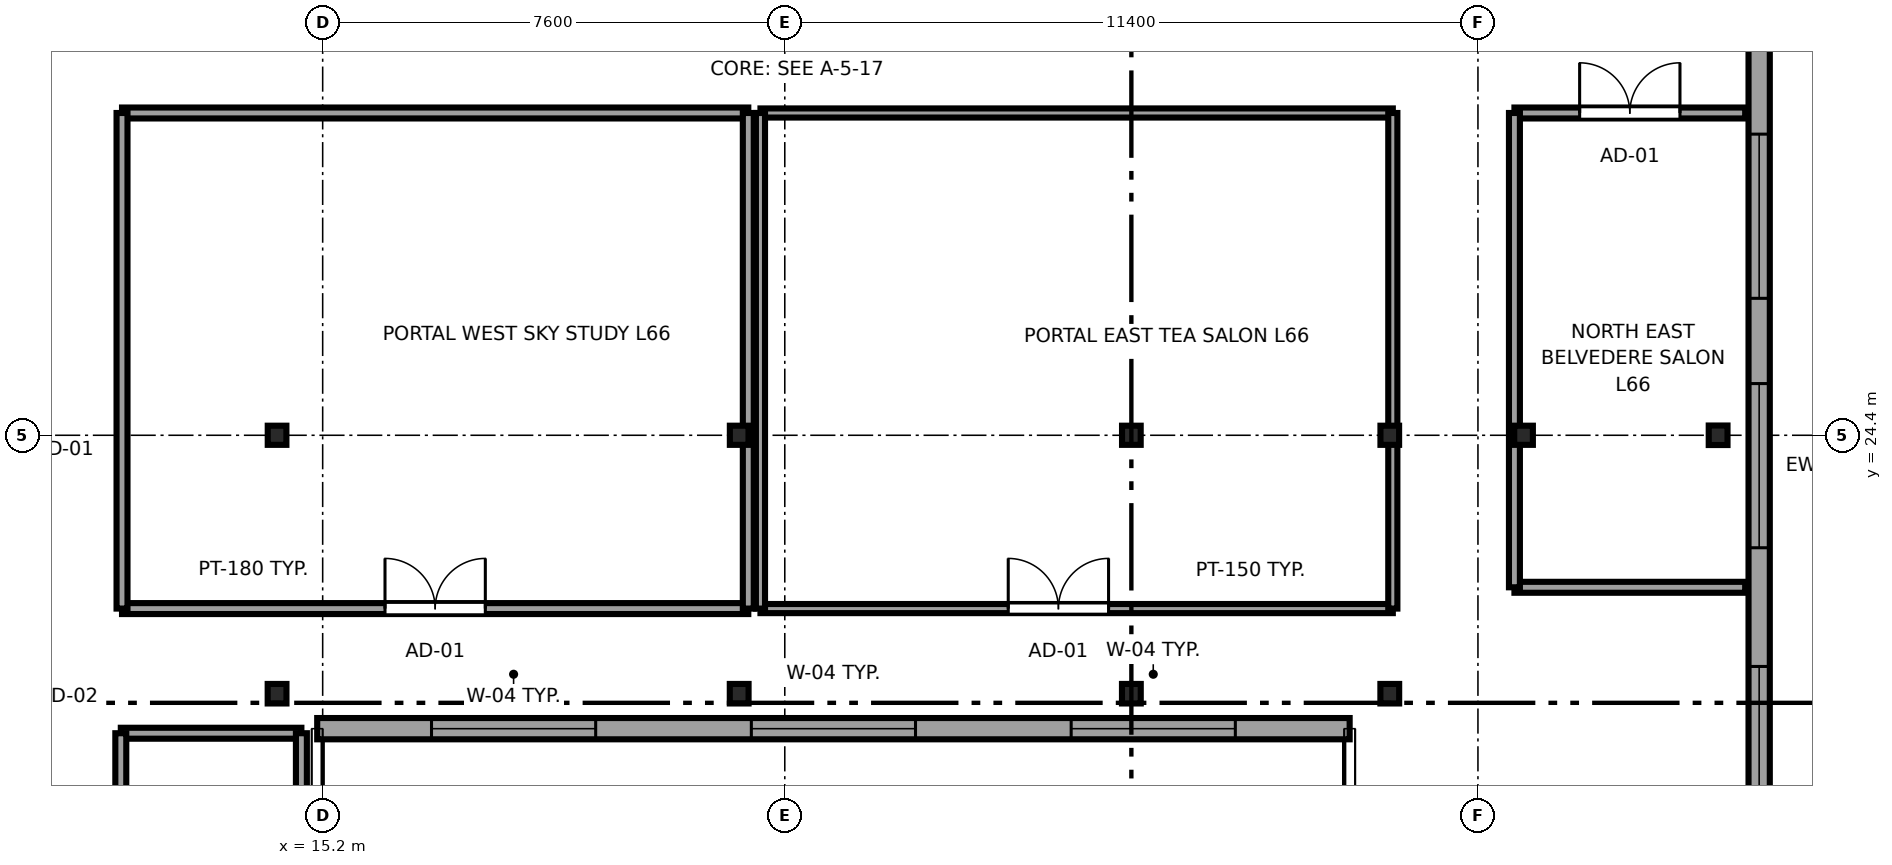
"""IFC4 building model, lengths in metres.
Left out: names, types, materials, properties, quantities, classifications, styles, units other than length and angle.
Written with IfcOpenShell. Run it as: python <this file> out.ifc"""

import sys

from ifc_helpers import new_model, si_unit, direction, frame, frame_2d, origin, origin_2d, place, context, subcontext, project, spatial, rectangle, i_section, extrude, source, transform, mapped, element, fill, save


model = new_model("IFC4")
c1 = context("Model", 3, precision=1e-05, world=origin(), true_north=direction((0.0, 1.0)))
c2 = subcontext(c1, "Body", "Model", "MODEL_VIEW")
j1 = project(units=[si_unit("LENGTHUNIT", "METRE"), si_unit("PLANEANGLEUNIT", "RADIAN")], contexts=[c1])
p1 = place(None, origin())
s1 = spatial("IfcSite", under=j1, at=p1, CompositionType="ELEMENT")
p2 = place(p1, origin())
s2 = spatial("IfcBuilding", under=s1, at=p2, CompositionType="ELEMENT")
p3 = place(p2, frame((0.0, 0.0, 248.75)))
s3 = spatial("IfcBuildingStorey", under=s2, at=p3, CompositionType="ELEMENT", Elevation=248.75)
m1 = source(origin(), c2, "Body", "SweptSolid", [
    extrude(i_section(OverallWidth=0.307, OverallDepth=0.315, WebThickness=0.012, FlangeThickness=0.019, FilletRadius=0.017, at=origin_2d()), origin(), (0.0, 0.0, 1.0), 3.55),
])
for number, where, z_axis, x_axis in (
    (1, (14.45, 24.4, 0.0), (0.0, 0.0, 1.0), (1.0, 0.0, 0.0)),
    (2, (22.05, 24.4, 0.0), (0.0, 0.0, 1.0), (1.0, 0.0, 0.0)),
    (3, (28.5, 24.4, 0.0), (0.0, 0.0, 1.0), (1.0, 0.0, 0.0)),
    (4, (32.75, 24.4, 0.0), (0.0, 0.0, 1.0), (1.0, 0.0, 0.0)),
    (5, (34.95, 24.4, 0.0), (0.0, 0.0, 1.0), (1.0, 0.0, 0.0)),
):
    element("IfcColumn", number, at=place(p3, frame(where, z_axis=z_axis, x_axis=x_axis)), inside=s3, PredefinedType="COLUMN", context=c2, shape_type="MappedRepresentation", body=[
        mapped(m1, transform((0.0, 0.0, 0.0), x_axis=(1.0, 0.0, 0.0), y_axis=(0.0, 1.0, 0.0), z_axis=(0.0, 0.0, 1.0), scale=1.0)),
    ])
m2 = source(origin(), c2, "Body", "SweptSolid", [
    extrude(i_section(OverallWidth=0.309, OverallDepth=0.321, WebThickness=0.014, FlangeThickness=0.022, FilletRadius=0.017, at=origin_2d()), origin(), (0.0, 0.0, 1.0), 3.55),
])
for number, where, z_axis, x_axis in (
    (6, (38.15, 24.4, 0.0), (0.0, 0.0, 1.0), (1.0, 0.0, 0.0)),
    (7, (14.45, 20.15, 0.0), (0.0, 0.0, 1.0), (1.0, 0.0, 0.0)),
    (8, (22.05, 20.15, 0.0), (0.0, 0.0, 1.0), (1.0, 0.0, 0.0)),
    (9, (28.5, 20.15, 0.0), (0.0, 0.0, 1.0), (1.0, 0.0, 0.0)),
    (10, (32.75, 20.15, 0.0), (0.0, 0.0, 1.0), (1.0, 0.0, 0.0)),
):
    element("IfcColumn", number, at=place(p3, frame(where, z_axis=z_axis, x_axis=x_axis)), inside=s3, PredefinedType="COLUMN", context=c2, shape_type="MappedRepresentation", body=[
        mapped(m2, transform((0.0, 0.0, 0.0), x_axis=(1.0, 0.0, 0.0), y_axis=(0.0, 1.0, 0.0), z_axis=(0.0, 0.0, 1.0), scale=1.0)),
    ])
p4 = place(p3, frame((15.11, 19.575, 0.0), z_axis=(0.0, 0.0, 1.0), x_axis=(1.0, 0.0, 0.0)))
e11 = element("IfcWall", 11, at=p4, inside=s3, PredefinedType="SOLIDWALL", context=c2, shape_type="SweptSolid", body=[
    extrude(rectangle(XDim=16.98, YDim=0.35, at=frame_2d((8.49, 0.0))), origin(), (0.0, 0.0, 1.0), 3.37),
])
p5 = place(p4, frame((1.88, 0.0, 0.68)))
e12 = element("IfcOpeningElement", 12, at=p5, cuts=e11, PredefinedType="OPENING", context=c2, shape_type="SweptSolid", body=[
    extrude(rectangle(XDim=2.7, YDim=1.95, at=frame_2d((1.35, 0.975))), frame((0.0, 0.185, 0.0), z_axis=(0.0, -1.0, 0.0), x_axis=(1.0, 0.0, 0.0)), (0.0, 0.0, 1.0), 0.37),
])
p6 = place(p4, frame((7.14, 0.0, 0.68)))
e13 = element("IfcOpeningElement", 13, at=p6, cuts=e11, PredefinedType="OPENING", context=c2, shape_type="SweptSolid", body=[
    extrude(rectangle(XDim=2.7, YDim=1.95, at=frame_2d((1.35, 0.975))), frame((0.0, 0.185, 0.0), z_axis=(0.0, -1.0, 0.0), x_axis=(1.0, 0.0, 0.0)), (0.0, 0.0, 1.0), 0.37),
])
p7 = place(p4, frame((12.4, 0.0, 0.68)))
e14 = element("IfcOpeningElement", 14, at=p7, cuts=e11, PredefinedType="OPENING", context=c2, shape_type="SweptSolid", body=[
    extrude(rectangle(XDim=2.7, YDim=1.95, at=frame_2d((1.35, 0.975))), frame((0.0, 0.185, 0.0), z_axis=(0.0, -1.0, 0.0), x_axis=(1.0, 0.0, 0.0)), (0.0, 0.0, 1.0), 0.37),
])
p8 = place(p3, frame((38.825, 7.017, 0.0), z_axis=(0.0, 0.0, 1.0), x_axis=(0.0, 1.0, 0.0)))
e15 = element("IfcWall", 15, at=p8, inside=s3, PredefinedType="SOLIDWALL", context=c2, shape_type="SweptSolid", body=[
    extrude(rectangle(XDim=33.766, YDim=0.35, at=frame_2d((16.883, 0.0))), origin(), (0.0, 0.0, 1.0), 3.37),
])
p9 = place(p8, frame((1.576, 0.0, 0.68)))
e16 = element("IfcOpeningElement", 16, at=p9, cuts=e15, PredefinedType="OPENING", context=c2, shape_type="SweptSolid", body=[
    extrude(rectangle(XDim=2.7, YDim=1.95, at=frame_2d((1.35, 0.975))), frame((0.0, 0.185, 0.0), z_axis=(0.0, -1.0, 0.0), x_axis=(1.0, 0.0, 0.0)), (0.0, 0.0, 1.0), 0.37),
])
p10 = place(p8, frame((6.228, 0.0, 0.68)))
e17 = element("IfcOpeningElement", 17, at=p10, cuts=e15, PredefinedType="OPENING", context=c2, shape_type="SweptSolid", body=[
    extrude(rectangle(XDim=2.7, YDim=1.95, at=frame_2d((1.35, 0.975))), frame((0.0, 0.185, 0.0), z_axis=(0.0, -1.0, 0.0), x_axis=(1.0, 0.0, 0.0)), (0.0, 0.0, 1.0), 0.37),
])
p11 = place(p8, frame((10.881, 0.0, 0.68)))
e18 = element("IfcOpeningElement", 18, at=p11, cuts=e15, PredefinedType="OPENING", context=c2, shape_type="SweptSolid", body=[
    extrude(rectangle(XDim=2.7, YDim=1.95, at=frame_2d((1.35, 0.975))), frame((0.0, 0.185, 0.0), z_axis=(0.0, -1.0, 0.0), x_axis=(1.0, 0.0, 0.0)), (0.0, 0.0, 1.0), 0.37),
])
p12 = place(p8, frame((15.533, 0.0, 0.68)))
e19 = element("IfcOpeningElement", 19, at=p12, cuts=e15, PredefinedType="OPENING", context=c2, shape_type="SweptSolid", body=[
    extrude(rectangle(XDim=2.7, YDim=1.95, at=frame_2d((1.35, 0.975))), frame((0.0, 0.185, 0.0), z_axis=(0.0, -1.0, 0.0), x_axis=(1.0, 0.0, 0.0)), (0.0, 0.0, 1.0), 0.37),
])
p13 = place(p8, frame((19.635, 0.0, 0.68)))
e20 = element("IfcOpeningElement", 20, at=p13, cuts=e15, PredefinedType="OPENING", context=c2, shape_type="SweptSolid", body=[
    extrude(rectangle(XDim=2.7, YDim=1.95, at=frame_2d((1.35, 0.975))), frame((0.0, 0.185, 0.0), z_axis=(0.0, -1.0, 0.0), x_axis=(1.0, 0.0, 0.0)), (0.0, 0.0, 1.0), 0.37),
])
p14 = place(p8, frame((25.387, 0.0, 0.68)))
e21 = element("IfcOpeningElement", 21, at=p14, cuts=e15, PredefinedType="OPENING", context=c2, shape_type="SweptSolid", body=[
    extrude(rectangle(XDim=2.7, YDim=1.95, at=frame_2d((1.35, 0.975))), frame((0.0, 0.185, 0.0), z_axis=(0.0, -1.0, 0.0), x_axis=(1.0, 0.0, 0.0)), (0.0, 0.0, 1.0), 0.37),
])
p15 = place(p8, frame((29.489, 0.0, 0.68)))
e22 = element("IfcOpeningElement", 22, at=p15, cuts=e15, PredefinedType="OPENING", context=c2, shape_type="SweptSolid", body=[
    extrude(rectangle(XDim=2.7, YDim=1.95, at=frame_2d((1.35, 0.975))), frame((0.0, 0.185, 0.0), z_axis=(0.0, -1.0, 0.0), x_axis=(1.0, 0.0, 0.0)), (0.0, 0.0, 1.0), 0.37),
])
p16 = place(p3, frame((11.88, 19.5, 0.0), z_axis=(0.0, 0.0, 1.0), x_axis=(1.0, 0.0, 0.0)))
e23 = element("IfcWall", 23, at=p16, inside=s3, PredefinedType="PARTITIONING", context=c2, shape_type="SweptSolid", body=[
    extrude(rectangle(XDim=2.97, YDim=0.18, at=frame_2d((1.485, 0.0))), origin(), (0.0, 0.0, 1.0), 3.37),
])
p17 = place(p3, frame((11.88, 10.2, 0.0), z_axis=(0.0, 0.0, 1.0), x_axis=(0.0, 1.0, 0.0)))
e24 = element("IfcWall", 24, at=p17, inside=s3, PredefinedType="PARTITIONING", context=c2, shape_type="SweptSolid", body=[
    extrude(rectangle(XDim=9.3, YDim=0.18, at=frame_2d((4.65, 0.0))), origin(), (0.0, 0.0, 1.0), 3.37),
])
p18 = place(p17, frame((3.825, 0.0, 0.0)))
e25 = element("IfcOpeningElement", 25, at=p18, cuts=e24, PredefinedType="OPENING", context=c2, shape_type="SweptSolid", body=[
    extrude(rectangle(XDim=1.65, YDim=2.15, at=frame_2d((0.825, 1.075))), frame((0.0, 0.1, 0.0), z_axis=(0.0, -1.0, 0.0), x_axis=(1.0, 0.0, 0.0)), (0.0, 0.0, 1.0), 0.2),
])
p19 = place(p3, frame((14.85, 10.2, 0.0), z_axis=(0.0, 0.0, 1.0), x_axis=(0.0, 1.0, 0.0)))
e26 = element("IfcWall", 26, at=p19, inside=s3, PredefinedType="PARTITIONING", context=c2, shape_type="SweptSolid", body=[
    extrude(rectangle(XDim=9.3, YDim=0.18, at=frame_2d((4.65, 0.0))), origin(), (0.0, 0.0, 1.0), 3.37),
])
p20 = place(p3, frame((11.9, 21.55, 0.0), z_axis=(0.0, 0.0, 1.0), x_axis=(1.0, 0.0, 0.0)))
e27 = element("IfcWall", 27, at=p20, inside=s3, PredefinedType="PARTITIONING", context=c2, shape_type="SweptSolid", body=[
    extrude(rectangle(XDim=10.3, YDim=0.18, at=frame_2d((5.15, 0.0))), origin(), (0.0, 0.0, 1.0), 3.37),
])
p21 = place(p20, frame((4.325, 0.0, 0.0)))
e28 = element("IfcOpeningElement", 28, at=p21, cuts=e27, PredefinedType="OPENING", context=c2, shape_type="SweptSolid", body=[
    extrude(rectangle(XDim=1.65, YDim=2.15, at=frame_2d((0.825, 1.075))), frame((0.0, 0.1, 0.0), z_axis=(0.0, -1.0, 0.0), x_axis=(1.0, 0.0, 0.0)), (0.0, 0.0, 1.0), 0.2),
])
p22 = place(p3, frame((11.9, 29.7, 0.0), z_axis=(0.0, 0.0, 1.0), x_axis=(1.0, 0.0, 0.0)))
e29 = element("IfcWall", 29, at=p22, inside=s3, PredefinedType="PARTITIONING", context=c2, shape_type="SweptSolid", body=[
    extrude(rectangle(XDim=10.3, YDim=0.18, at=frame_2d((5.15, 0.0))), origin(), (0.0, 0.0, 1.0), 3.37),
])
p23 = place(p3, frame((11.9, 21.55, 0.0), z_axis=(0.0, 0.0, 1.0), x_axis=(0.0, 1.0, 0.0)))
e30 = element("IfcWall", 30, at=p23, inside=s3, PredefinedType="PARTITIONING", context=c2, shape_type="SweptSolid", body=[
    extrude(rectangle(XDim=8.15, YDim=0.18, at=frame_2d((4.075, 0.0))), origin(), (0.0, 0.0, 1.0), 3.37),
])
p24 = place(p3, frame((22.2, 21.55, 0.0), z_axis=(0.0, 0.0, 1.0), x_axis=(0.0, 1.0, 0.0)))
e31 = element("IfcWall", 31, at=p24, inside=s3, PredefinedType="PARTITIONING", context=c2, shape_type="SweptSolid", body=[
    extrude(rectangle(XDim=8.15, YDim=0.18, at=frame_2d((4.075, 0.0))), origin(), (0.0, 0.0, 1.0), 2.827),
])
p25 = place(p3, frame((22.4, 21.55, 0.0), z_axis=(0.0, 0.0, 1.0), x_axis=(1.0, 0.0, 0.0)))
e32 = element("IfcWall", 32, at=p25, inside=s3, PredefinedType="PARTITIONING", context=c2, shape_type="SweptSolid", body=[
    extrude(rectangle(XDim=10.4, YDim=0.15, at=frame_2d((5.2, 0.0))), origin(), (0.0, 0.0, 1.0), 3.37),
])
p26 = place(p25, frame((4.075, 0.0, 0.0)))
e33 = element("IfcOpeningElement", 33, at=p26, cuts=e32, PredefinedType="OPENING", context=c2, shape_type="SweptSolid", body=[
    extrude(rectangle(XDim=1.65, YDim=2.15, at=frame_2d((0.825, 1.075))), frame((0.0, 0.085, 0.0), z_axis=(0.0, -1.0, 0.0), x_axis=(1.0, 0.0, 0.0)), (0.0, 0.0, 1.0), 0.17),
])
p27 = place(p3, frame((22.4, 29.7, 0.0), z_axis=(0.0, 0.0, 1.0), x_axis=(1.0, 0.0, 0.0)))
e34 = element("IfcWall", 34, at=p27, inside=s3, PredefinedType="PARTITIONING", context=c2, shape_type="SweptSolid", body=[
    extrude(rectangle(XDim=10.4, YDim=0.15, at=frame_2d((5.2, 0.0))), origin(), (0.0, 0.0, 1.0), 3.37),
])
p28 = place(p3, frame((22.4, 21.55, 0.0), z_axis=(0.0, 0.0, 1.0), x_axis=(0.0, 1.0, 0.0)))
e35 = element("IfcWall", 35, at=p28, inside=s3, PredefinedType="PARTITIONING", context=c2, shape_type="SweptSolid", body=[
    extrude(rectangle(XDim=8.15, YDim=0.15, at=frame_2d((4.075, 0.0))), origin(), (0.0, 0.0, 1.0), 3.37),
])
p29 = place(p3, frame((32.8, 21.55, 0.0), z_axis=(0.0, 0.0, 1.0), x_axis=(0.0, 1.0, 0.0)))
e36 = element("IfcWall", 36, at=p29, inside=s3, PredefinedType="PARTITIONING", context=c2, shape_type="SweptSolid", body=[
    extrude(rectangle(XDim=8.15, YDim=0.15, at=frame_2d((4.075, 0.0))), origin(), (0.0, 0.0, 1.0), 2.827),
])
p30 = place(p3, frame((34.8, 21.9, 0.0), z_axis=(0.0, 0.0, 1.0), x_axis=(1.0, 0.0, 0.0)))
e37 = element("IfcWall", 37, at=p30, inside=s3, PredefinedType="PARTITIONING", context=c2, shape_type="SweptSolid", body=[
    extrude(rectangle(XDim=3.795, YDim=0.18, at=frame_2d((1.897, 0.0))), origin(), (0.0, 0.0, 1.0), 3.37),
])
p31 = place(p3, frame((34.8, 29.7, 0.0), z_axis=(0.0, 0.0, 1.0), x_axis=(1.0, 0.0, 0.0)))
e38 = element("IfcWall", 38, at=p31, inside=s3, PredefinedType="PARTITIONING", context=c2, shape_type="SweptSolid", body=[
    extrude(rectangle(XDim=3.795, YDim=0.18, at=frame_2d((1.897, 0.0))), origin(), (0.0, 0.0, 1.0), 3.37),
])
p32 = place(p31, frame((1.073, 0.0, 0.0)))
e39 = element("IfcOpeningElement", 39, at=p32, cuts=e38, PredefinedType="OPENING", context=c2, shape_type="SweptSolid", body=[
    extrude(rectangle(XDim=1.65, YDim=2.15, at=frame_2d((0.825, 1.075))), frame((0.0, 0.1, 0.0), z_axis=(0.0, -1.0, 0.0), x_axis=(1.0, 0.0, 0.0)), (0.0, 0.0, 1.0), 0.2),
])
p33 = place(p3, frame((34.8, 21.9, 0.0), z_axis=(0.0, 0.0, 1.0), x_axis=(0.0, 1.0, 0.0)))
e40 = element("IfcWall", 40, at=p33, inside=s3, PredefinedType="PARTITIONING", context=c2, shape_type="SweptSolid", body=[
    extrude(rectangle(XDim=7.8, YDim=0.18, at=frame_2d((3.9, 0.0))), origin(), (0.0, 0.0, 1.0), 2.827),
])
m3 = source(origin(), c2, "Body", "SweptSolid", [
    extrude(rectangle(XDim=2.7, YDim=1.95, at=frame_2d((1.35, 0.975))), frame((0.0, 0.09, 0.0), z_axis=(0.0, -1.0, 0.0), x_axis=(1.0, 0.0, 0.0)), (0.0, 0.0, 1.0), 0.06),
])
p34 = place(p5, origin())
e41 = element("IfcWindow", 41, at=p34, inside=s3, PartitioningType="TRIPLE_PANEL_HORIZONTAL", PredefinedType="WINDOW", context=c2, shape_type="MappedRepresentation", body=[
    mapped(m3, transform((0.0, 0.0, 0.0), x_axis=(1.0, 0.0, 0.0), y_axis=(0.0, 1.0, 0.0), z_axis=(0.0, 0.0, 1.0), scale=1.0)),
])
fill(e12, e41)
p35 = place(p6, origin())
e42 = element("IfcWindow", 42, at=p35, inside=s3, PartitioningType="TRIPLE_PANEL_HORIZONTAL", PredefinedType="WINDOW", context=c2, shape_type="MappedRepresentation", body=[
    mapped(m3, transform((0.0, 0.0, 0.0), x_axis=(1.0, 0.0, 0.0), y_axis=(0.0, 1.0, 0.0), z_axis=(0.0, 0.0, 1.0), scale=1.0)),
])
fill(e13, e42)
p36 = place(p7, origin())
e43 = element("IfcWindow", 43, at=p36, inside=s3, PartitioningType="TRIPLE_PANEL_HORIZONTAL", PredefinedType="WINDOW", context=c2, shape_type="MappedRepresentation", body=[
    mapped(m3, transform((0.0, 0.0, 0.0), x_axis=(1.0, 0.0, 0.0), y_axis=(0.0, 1.0, 0.0), z_axis=(0.0, 0.0, 1.0), scale=1.0)),
])
fill(e14, e43)
p37 = place(p11, origin())
e44 = element("IfcWindow", 44, at=p37, inside=s3, PartitioningType="TRIPLE_PANEL_HORIZONTAL", PredefinedType="WINDOW", context=c2, shape_type="MappedRepresentation", body=[
    mapped(m3, transform((0.0, 0.0, 0.0), x_axis=(1.0, 0.0, 0.0), y_axis=(0.0, 1.0, 0.0), z_axis=(0.0, 0.0, 1.0), scale=1.0)),
])
fill(e18, e44)
p38 = place(p12, origin())
e45 = element("IfcWindow", 45, at=p38, inside=s3, PartitioningType="TRIPLE_PANEL_HORIZONTAL", PredefinedType="WINDOW", context=c2, shape_type="MappedRepresentation", body=[
    mapped(m3, transform((0.0, 0.0, 0.0), x_axis=(1.0, 0.0, 0.0), y_axis=(0.0, 1.0, 0.0), z_axis=(0.0, 0.0, 1.0), scale=1.0)),
])
fill(e19, e45)
p39 = place(p13, origin())
e46 = element("IfcWindow", 46, at=p39, inside=s3, PartitioningType="TRIPLE_PANEL_HORIZONTAL", PredefinedType="WINDOW", context=c2, shape_type="MappedRepresentation", body=[
    mapped(m3, transform((0.0, 0.0, 0.0), x_axis=(1.0, 0.0, 0.0), y_axis=(0.0, 1.0, 0.0), z_axis=(0.0, 0.0, 1.0), scale=1.0)),
])
fill(e20, e46)
m4 = source(origin(), c2, "Body", "SweptSolid", [
    extrude(rectangle(XDim=1.65, YDim=2.15, at=frame_2d((0.825, 1.075))), frame((0.0, 0.025, 0.0), z_axis=(0.0, -1.0, 0.0), x_axis=(1.0, 0.0, 0.0)), (0.0, 0.0, 1.0), 0.05),
])
p40 = place(p21, origin())
e47 = element("IfcDoor", 47, at=p40, inside=s3, OperationType="DOUBLE_DOOR_SINGLE_SWING", PredefinedType="DOOR", context=c2, shape_type="MappedRepresentation", body=[
    mapped(m4, transform((0.0, 0.0, 0.0), x_axis=(1.0, 0.0, 0.0), y_axis=(0.0, 1.0, 0.0), z_axis=(0.0, 0.0, 1.0), scale=1.0)),
])
fill(e28, e47)
p41 = place(p26, origin())
e48 = element("IfcDoor", 48, at=p41, inside=s3, OperationType="DOUBLE_DOOR_SINGLE_SWING", PredefinedType="DOOR", context=c2, shape_type="MappedRepresentation", body=[
    mapped(m4, transform((0.0, 0.0, 0.0), x_axis=(1.0, 0.0, 0.0), y_axis=(0.0, 1.0, 0.0), z_axis=(0.0, 0.0, 1.0), scale=1.0)),
])
fill(e33, e48)
p42 = place(p32, origin())
e49 = element("IfcDoor", 49, at=p42, inside=s3, OperationType="DOUBLE_DOOR_SINGLE_SWING", PredefinedType="DOOR", context=c2, shape_type="MappedRepresentation", body=[
    mapped(m4, transform((0.0, 0.0, 0.0), x_axis=(1.0, 0.0, 0.0), y_axis=(0.0, 1.0, 0.0), z_axis=(0.0, 0.0, 1.0), scale=1.0)),
])
fill(e39, e49)
save(model, sys.argv[1])
